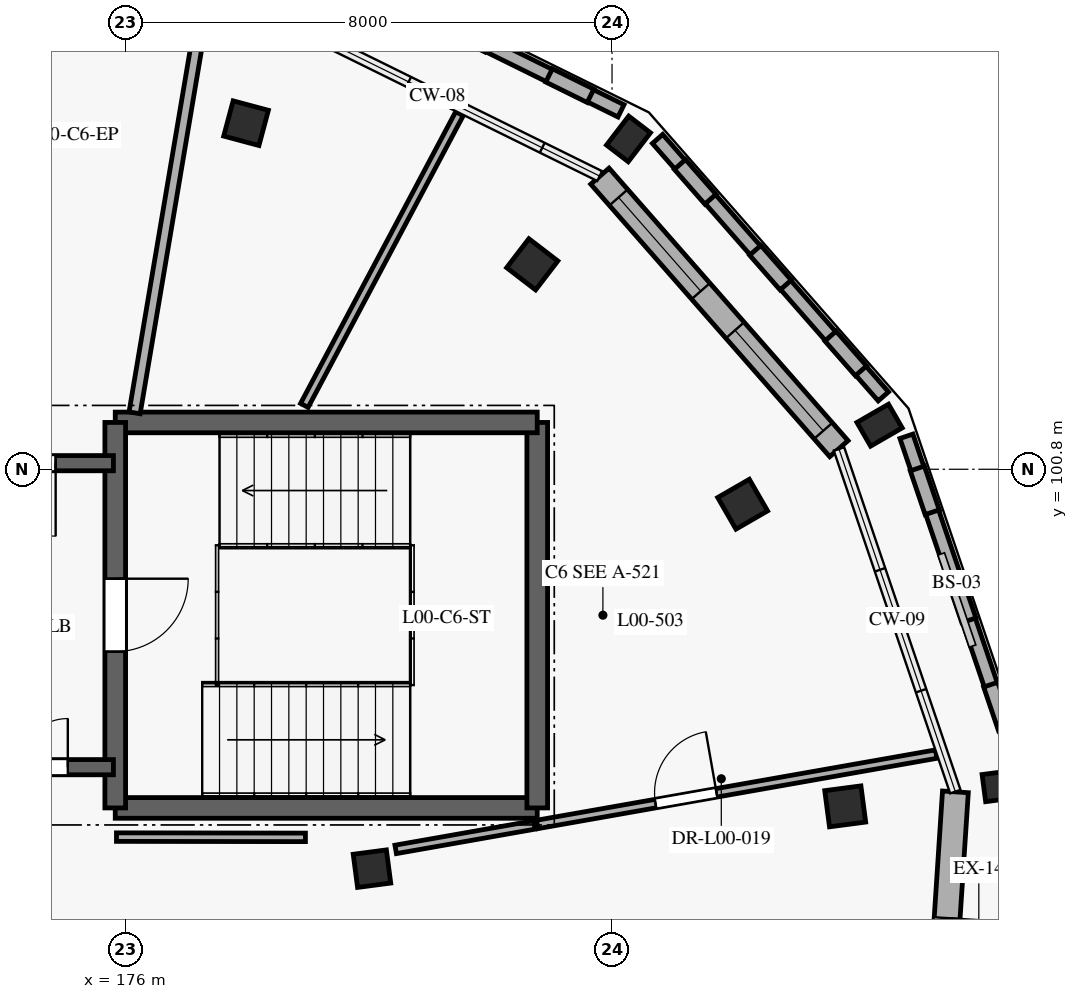
"""IFC4 building model, lengths in metres.
Left out: names, types, materials, properties, quantities, classifications, styles, units other than length and angle.
Written with IfcOpenShell. Run it as: python <this file> out.ifc"""

import sys

from ifc_helpers import new_model, si_unit, direction, frame, frame_2d, origin, origin_2d, place, context, subcontext, project, spatial, rectangle, extrude, element, fill, save


model = new_model("IFC4")
c1 = context("Model", 3, precision=1e-05, world=origin(), true_north=direction((0.0, 1.0)))
c2 = subcontext(c1, "Body", "Model", "MODEL_VIEW")
j1 = project(units=[si_unit("LENGTHUNIT", "METRE"), si_unit("PLANEANGLEUNIT", "RADIAN")], contexts=[c1])
p1 = place(None, origin())
s1 = spatial("IfcSite", under=j1, at=p1, CompositionType="ELEMENT")
p2 = place(p1, origin())
s2 = spatial("IfcBuilding", under=s1, at=p2, CompositionType="ELEMENT")
p3 = place(p2, origin())
s3 = spatial("IfcBuildingStorey", under=s2, at=p3, CompositionType="ELEMENT", Elevation=0.0)
for number, where, z_axis, x_axis in (
    (1, (190.413, 95.595, 0.0), (0.0, 0.0, 1.0), (-0.131, 0.991, 0.0)),
    (2, (188.4, 101.525, 0.0), (0.0, 0.0, 1.0), (-0.5, 0.866, 0.0)),
    (3, (184.271, 106.233, 0.0), (0.0, 0.0, 1.0), (-0.793, 0.609, 0.0)),
):
    element("IfcColumn", number, at=place(p3, frame(where, z_axis=z_axis, x_axis=x_axis)), inside=s3, PredefinedType="PILASTER", context=c2, shape_type="SweptSolid", body=[
        extrude(rectangle(XDim=0.45, YDim=0.6, at=origin_2d()), origin(), (0.0, 0.0, 1.0), 4.2),
    ])
for number, where, z_axis, x_axis in (
    (4, (187.835, 95.256, 0.0), (0.0, 0.0, 1.0), (-0.131, 0.991, 0.0)),
    (5, (186.148, 100.225, 0.0), (0.0, 0.0, 1.0), (-0.5, 0.866, 0.0)),
    (6, (182.688, 104.171, 0.0), (0.0, 0.0, 1.0), (-0.793, 0.609, 0.0)),
    (7, (177.981, 106.492, 0.0), (0.0, 0.0, 1.0), (-0.966, 0.259, 0.0)),
):
    element("IfcColumn", number, at=place(p3, frame(where, z_axis=z_axis, x_axis=x_axis)), inside=s3, PredefinedType="COLUMN", context=c2, shape_type="SweptSolid", body=[
        extrude(rectangle(XDim=0.6, YDim=0.6, at=origin_2d()), origin(), (0.0, 0.0, 1.0), 4.2),
    ])
p4 = place(p3, frame((180.052, 94.231, 0.0), z_axis=(0.0, 0.0, 1.0), x_axis=(0.991444861374, 0.13052619222, 0.0)))
e8 = element("IfcColumn", 8, at=p4, inside=s3, PredefinedType="COLUMN", context=c2, shape_type="SweptSolid", body=[
    extrude(rectangle(XDim=0.55, YDim=0.55, at=origin_2d()), origin(), (0.0, 0.0, 1.0), 4.2),
])
p5 = place(p3, frame((183.801, 105.621, 0.0), z_axis=(0.0, 0.0, 1.0), x_axis=(0.659353757459, -0.751832842143, 0.0)))
e9 = element("IfcWall", 9, at=p5, inside=s3, PredefinedType="SOLIDWALL", context=c2, shape_type="SweptSolid", body=[
    extrude(rectangle(XDim=5.961, YDim=0.4, at=frame_2d((2.98, 0.0))), origin(), (0.0, 0.0, 1.0), 3.94),
])
p6 = place(p5, frame((0.465, 0.0, 0.85)))
e10 = element("IfcOpeningElement", 10, at=p6, cuts=e9, PredefinedType="OPENING", context=c2, shape_type="SweptSolid", body=[
    extrude(rectangle(XDim=2.05, YDim=1.8, at=frame_2d((1.025, 0.9))), frame((0.0, 0.21, 0.0), z_axis=(0.0, -1.0, 0.0), x_axis=(1.0, 0.0, 0.0)), (0.0, 0.0, 1.0), 0.42),
])
p7 = place(p5, frame((3.371, 0.0, 0.85)))
e11 = element("IfcOpeningElement", 11, at=p7, cuts=e9, PredefinedType="OPENING", context=c2, shape_type="SweptSolid", body=[
    extrude(rectangle(XDim=2.2, YDim=1.8, at=frame_2d((1.1, 0.9))), frame((0.0, 0.21, 0.0), z_axis=(0.0, -1.0, 0.0), x_axis=(1.0, 0.0, 0.0)), (0.0, 0.0, 1.0), 0.42),
])
p8 = place(p3, frame((189.647, 95.494, 0.0), z_axis=(0.0, 0.0, 1.0), x_axis=(-0.065407169492, -0.997858658418, 0.0)))
e12 = element("IfcWall", 12, at=p8, inside=s3, PredefinedType="SOLIDWALL", context=c2, shape_type="SweptSolid", body=[
    extrude(rectangle(XDim=5.961, YDim=0.425, at=frame_2d((2.98, 0.0))), origin(), (0.0, 0.0, 1.0), 3.94),
])
p9 = place(p8, frame((2.081, 0.0, 0.0)))
e13 = element("IfcOpeningElement", 13, at=p9, cuts=e12, PredefinedType="OPENING", context=c2, shape_type="SweptSolid", body=[
    extrude(rectangle(XDim=1.8, YDim=2.16, at=frame_2d((0.9, 1.08))), frame((0.0, 0.222, 0.0), z_axis=(0.0, -1.0, 0.0), x_axis=(1.0, 0.0, 0.0)), (0.0, 0.0, 1.0), 0.445),
])
p10 = place(p3, frame((190.652, 96.009, 0.0), z_axis=(0.0, 0.0, 1.0), x_axis=(-0.321450435893, 0.946926405411, 0.0)))
e14 = element("IfcWall", 14, at=p10, inside=s3, PredefinedType="ELEMENTEDWALL", context=c2, shape_type="SweptSolid", body=[
    extrude(rectangle(XDim=5.632, YDim=0.225, at=frame_2d((2.816, 0.0))), origin(), (0.0, 0.0, 1.0), 0.55),
])
for number, where, z_axis, x_axis in (
    (15, (190.472, 96.538, 0.55), (0.0, 0.0, 1.0), (-0.322, 0.947, 0.0)),
    (16, (189.869, 98.316, 0.55), (0.0, 0.0, 1.0), (-0.321, 0.947, 0.0)),
):
    element("IfcWall", number, at=place(p3, frame(where, z_axis=z_axis, x_axis=x_axis)), inside=s3, PredefinedType="ELEMENTEDWALL", context=c2, shape_type="SweptSolid", body=[
        extrude(rectangle(XDim=0.76, YDim=0.245, at=frame_2d((0.38, 0.0))), origin(), (0.0, 0.0, 1.0), 3.39),
    ])
p11 = place(p3, frame((189.265, 100.094, 0.55), z_axis=(0.0, 0.0, 1.0), x_axis=(-0.321620473335, 0.946868666253, 0.0)))
e17 = element("IfcWall", 17, at=p11, inside=s3, PredefinedType="ELEMENTEDWALL", context=c2, shape_type="SweptSolid", body=[
    extrude(rectangle(XDim=0.76, YDim=0.245, at=frame_2d((0.38, 0.0))), origin(), (0.0, 0.0, 1.0), 3.39),
])
p12 = place(p3, frame((188.462, 101.999, 0.0), z_axis=(0.0, 0.0, 1.0), x_axis=(-0.659363462551, 0.751824330714, 0.0)))
e18 = element("IfcWall", 18, at=p12, inside=s3, PredefinedType="ELEMENTEDWALL", context=c2, shape_type="SweptSolid", body=[
    extrude(rectangle(XDim=5.632, YDim=0.225, at=frame_2d((2.816, 0.0))), origin(), (0.0, 0.0, 1.0), 0.55),
])
p13 = place(p3, frame((188.094, 102.419, 0.55), z_axis=(0.0, 0.0, 1.0), x_axis=(-0.659323125798, 0.751859704857, 0.0)))
e19 = element("IfcWall", 19, at=p13, inside=s3, PredefinedType="ELEMENTEDWALL", context=c2, shape_type="SweptSolid", body=[
    extrude(rectangle(XDim=0.76, YDim=0.245, at=frame_2d((0.38, 0.0))), origin(), (0.0, 0.0, 1.0), 3.39),
])
p14 = place(p3, frame((186.856, 103.83, 0.55), z_axis=(0.0, 0.0, 1.0), x_axis=(-0.659345470196, 0.751840109951, 0.0)))
e20 = element("IfcWall", 20, at=p14, inside=s3, PredefinedType="ELEMENTEDWALL", context=c2, shape_type="SweptSolid", body=[
    extrude(rectangle(XDim=0.76, YDim=0.245, at=frame_2d((0.38, 0.0))), origin(), (0.0, 0.0, 1.0), 3.39),
])
p15 = place(p3, frame((185.618, 105.242, 0.55), z_axis=(0.0, 0.0, 1.0), x_axis=(-0.659504701015, 0.751700438565, 0.0)))
e21 = element("IfcWall", 21, at=p15, inside=s3, PredefinedType="ELEMENTEDWALL", context=c2, shape_type="SweptSolid", body=[
    extrude(rectangle(XDim=0.76, YDim=0.245, at=frame_2d((0.38, 0.0))), origin(), (0.0, 0.0, 1.0), 3.39),
])
p16 = place(p3, frame((184.147, 106.695, 0.0), z_axis=(0.0, 0.0, 1.0), x_axis=(-0.896858387366, 0.442317796398, 0.0)))
e22 = element("IfcWall", 22, at=p16, inside=s3, PredefinedType="ELEMENTEDWALL", context=c2, shape_type="SweptSolid", body=[
    extrude(rectangle(XDim=5.633, YDim=0.225, at=frame_2d((2.816, 0.0))), origin(), (0.0, 0.0, 1.0), 0.55),
])
for number, where, z_axis, x_axis in (
    (23, (183.646, 106.942, 0.55), (0.0, 0.0, 1.0), (-0.897, 0.442, 0.0)),
    (24, (181.962, 107.772, 0.55), (0.0, 0.0, 1.0), (-0.897, 0.442, 0.0)),
):
    element("IfcWall", number, at=place(p3, frame(where, z_axis=z_axis, x_axis=x_axis)), inside=s3, PredefinedType="ELEMENTEDWALL", context=c2, shape_type="SweptSolid", body=[
        extrude(rectangle(XDim=0.76, YDim=0.245, at=frame_2d((0.38, 0.0))), origin(), (0.0, 0.0, 1.0), 3.39),
    ])
p17 = place(p3, frame((175.83, 95.23, 0.0), z_axis=(0.0, 0.0, 1.0), x_axis=(1.0, 0.0, 0.0)))
e25 = element("IfcWall", 25, at=p17, inside=s3, PredefinedType="SHEAR", context=c2, shape_type="SweptSolid", body=[
    extrude(rectangle(XDim=6.94, YDim=0.34, at=frame_2d((3.47, 0.0))), origin(), (0.0, 0.0, 1.0), 3.95),
])
p18 = place(p3, frame((182.77, 95.23, 0.0), z_axis=(0.0, 0.0, 1.0), x_axis=(0.0, 1.0, 0.0)))
e26 = element("IfcWall", 26, at=p18, inside=s3, PredefinedType="SHEAR", context=c2, shape_type="SweptSolid", body=[
    extrude(rectangle(XDim=6.34, YDim=0.34, at=frame_2d((3.17, 0.0))), origin(), (0.0, 0.0, 1.0), 3.95),
])
p19 = place(p3, frame((182.77, 101.57, 0.0), z_axis=(0.0, 0.0, 1.0), x_axis=(-1.0, 0.0, 0.0)))
e27 = element("IfcWall", 27, at=p19, inside=s3, PredefinedType="SHEAR", context=c2, shape_type="SweptSolid", body=[
    extrude(rectangle(XDim=6.94, YDim=0.34, at=frame_2d((3.47, 0.0))), origin(), (0.0, 0.0, 1.0), 3.95),
])
p20 = place(p3, frame((175.83, 101.57, 0.0), z_axis=(0.0, 0.0, 1.0), x_axis=(0.0, -1.0, 0.0)))
e28 = element("IfcWall", 28, at=p20, inside=s3, PredefinedType="SHEAR", context=c2, shape_type="SweptSolid", body=[
    extrude(rectangle(XDim=6.34, YDim=0.34, at=frame_2d((3.17, 0.0))), origin(), (0.0, 0.0, 1.0), 3.95),
])
p21 = place(p20, frame((2.57, 0.0, 0.0)))
e29 = element("IfcOpeningElement", 29, at=p21, cuts=e28, PredefinedType="OPENING", context=c2, shape_type="SweptSolid", body=[
    extrude(rectangle(XDim=1.2, YDim=2.1, at=frame_2d((0.6, 1.05))), frame((0.0, 0.18, 0.0), z_axis=(0.0, -1.0, 0.0), x_axis=(1.0, 0.0, 0.0)), (0.0, 0.0, 1.0), 0.36),
])
p22 = place(p3, frame((172.7, 95.9, 0.0), z_axis=(0.0, 0.0, 1.0), x_axis=(1.0, 0.0, 0.0)))
e30 = element("IfcWall", 30, at=p22, inside=s3, PredefinedType="SHEAR", context=c2, shape_type="SweptSolid", body=[
    extrude(rectangle(XDim=3.1, YDim=0.25, at=frame_2d((1.55, 0.0))), origin(), (0.0, 0.0, 1.0), 3.95),
])
p23 = place(p22, frame((0.75, 0.0, 0.0)))
e31 = element("IfcOpeningElement", 31, at=p23, cuts=e30, PredefinedType="OPENING", context=c2, shape_type="SweptSolid", body=[
    extrude(rectangle(XDim=1.6, YDim=2.15, at=frame_2d((0.8, 1.075))), frame((0.0, 0.135, 0.0), z_axis=(0.0, -1.0, 0.0), x_axis=(1.0, 0.0, 0.0)), (0.0, 0.0, 1.0), 0.27),
])
p24 = place(p3, frame((175.8, 100.9, 0.0), z_axis=(0.0, 0.0, 1.0), x_axis=(-1.0, 0.0, 0.0)))
e32 = element("IfcWall", 32, at=p24, inside=s3, PredefinedType="SHEAR", context=c2, shape_type="SweptSolid", body=[
    extrude(rectangle(XDim=3.1, YDim=0.25, at=frame_2d((1.55, 0.0))), origin(), (0.0, 0.0, 1.0), 3.95),
])
p25 = place(p24, frame((0.95, 0.0, 0.0)))
e33 = element("IfcOpeningElement", 33, at=p25, cuts=e32, PredefinedType="OPENING", context=c2, shape_type="SweptSolid", body=[
    extrude(rectangle(XDim=1.2, YDim=2.1, at=frame_2d((0.6, 1.05))), frame((0.0, 0.135, 0.0), z_axis=(0.0, -1.0, 0.0), x_axis=(1.0, 0.0, 0.0)), (0.0, 0.0, 1.0), 0.27),
])
p26 = place(p3, frame((176.148, 101.728, 0.0), z_axis=(0.0, 0.0, 1.0), x_axis=(0.166482807525, 0.986044357419, 0.0)))
e34 = element("IfcWall", 34, at=p26, inside=s3, PredefinedType="PARTITIONING", context=c2, shape_type="SweptSolid", body=[
    extrude(rectangle(XDim=6.515, YDim=0.185, at=frame_2d((3.258, 0.0))), origin(), (0.0, 0.0, 1.0), 3.915),
])
p27 = place(p3, frame((180.442, 94.548, 0.0), z_axis=(0.0, 0.0, 1.0), x_axis=(0.984803709336, 0.173671108934, 0.0)))
e35 = element("IfcWall", 35, at=p27, inside=s3, PredefinedType="PLUMBINGWALL", context=c2, shape_type="SweptSolid", body=[
    extrude(rectangle(XDim=2.317, YDim=0.14, at=frame_2d((1.158, 0.0))), origin(), (0.0, 0.0, 1.0), 3.267),
])
p28 = place(p3, frame((182.77, 94.958, 0.0), z_axis=(0.0, 0.0, 1.0), x_axis=(0.984809373829, 0.173638985308, 0.0)))
e36 = element("IfcWall", 36, at=p28, inside=s3, PredefinedType="PLUMBINGWALL", context=c2, shape_type="SweptSolid", body=[
    extrude(rectangle(XDim=6.662, YDim=0.14, at=frame_2d((3.331, 0.0))), origin(), (0.0, 0.0, 1.0), 3.915),
])
p29 = place(p28, frame((1.975, 0.0, 0.0)))
e37 = element("IfcOpeningElement", 37, at=p29, cuts=e36, PredefinedType="OPENING", context=c2, shape_type="SweptSolid", body=[
    extrude(rectangle(XDim=1.02, YDim=2.06, at=frame_2d((0.51, 1.03))), frame((0.0, 0.08, 0.0), z_axis=(0.0, -1.0, 0.0), x_axis=(1.0, 0.0, 0.0)), (0.0, 0.0, 1.0), 0.16),
])
p30 = place(p3, frame((181.491, 106.648, 0.0), z_axis=(0.0, 0.0, 1.0), x_axis=(-0.46950120322, -0.882931832122, 0.0)))
e38 = element("IfcWall", 38, at=p30, inside=s3, PredefinedType="PLUMBINGWALL", context=c2, shape_type="SweptSolid", body=[
    extrude(rectangle(XDim=5.434, YDim=0.14, at=frame_2d((2.717, 0.0))), origin(), (0.0, 0.0, 1.0), 3.915),
])
p31 = place(p3, frame((175.85, 94.75, 0.0), z_axis=(0.0, 0.0, 1.0), x_axis=(0.999999108177, -0.001335531844, 0.0)))
e39 = element("IfcWall", 39, at=p31, inside=s3, PredefinedType="PLUMBINGWALL", context=c2, shape_type="SweptSolid", body=[
    extrude(rectangle(XDim=3.108, YDim=0.14, at=frame_2d((1.554, 0.0))), origin(), (0.0, 0.0, 1.0), 3.915),
])
p32 = place(p9, origin())
e40 = element("IfcDoor", 40, at=p32, inside=s3, OperationType="DOUBLE_DOOR_SINGLE_SWING", PredefinedType="DOOR", context=c2, shape_type="SweptSolid", body=[
    extrude(rectangle(XDim=1.8, YDim=2.16, at=frame_2d((0.9, 1.08))), frame((0.0, 0.025, 0.0), z_axis=(0.0, -1.0, 0.0), x_axis=(1.0, 0.0, 0.0)), (0.0, 0.0, 1.0), 0.05),
])
fill(e13, e40)
p33 = place(p6, origin())
e41 = element("IfcWindow", 41, at=p33, inside=s3, PartitioningType="SINGLE_PANEL", PredefinedType="WINDOW", context=c2, shape_type="SweptSolid", body=[
    extrude(rectangle(XDim=2.05, YDim=1.8, at=frame_2d((1.025, 0.9))), frame((0.0, 0.03, 0.0), z_axis=(0.0, -1.0, 0.0), x_axis=(1.0, 0.0, 0.0)), (0.0, 0.0, 1.0), 0.06),
])
fill(e10, e41)
p34 = place(p7, origin())
e42 = element("IfcWindow", 42, at=p34, inside=s3, PartitioningType="SINGLE_PANEL", PredefinedType="WINDOW", context=c2, shape_type="SweptSolid", body=[
    extrude(rectangle(XDim=2.2, YDim=1.8, at=frame_2d((1.1, 0.9))), frame((0.0, 0.03, 0.0), z_axis=(0.0, -1.0, 0.0), x_axis=(1.0, 0.0, 0.0)), (0.0, 0.0, 1.0), 0.06),
])
fill(e11, e42)
p35 = place(p21, frame((1.2, 0.0, 0.0), z_axis=(0.0, 0.0, 1.0), x_axis=(-1.0, 0.0, 0.0)))
e43 = element("IfcDoor", 43, at=p35, inside=s3, OperationType="SINGLE_SWING_LEFT", PredefinedType="DOOR", context=c2, shape_type="SweptSolid", body=[
    extrude(rectangle(XDim=1.2, YDim=2.1, at=frame_2d((0.6, 1.05))), frame((0.0, 0.025, 0.0), z_axis=(0.0, -1.0, 0.0), x_axis=(1.0, 0.0, 0.0)), (0.0, 0.0, 1.0), 0.05),
])
fill(e29, e43)
p36 = place(p23, frame((1.6, 0.0, 0.0), z_axis=(0.0, 0.0, 1.0), x_axis=(-1.0, 0.0, 0.0)))
e44 = element("IfcDoor", 44, at=p36, inside=s3, OperationType="DOUBLE_DOOR_SINGLE_SWING", PredefinedType="DOOR", context=c2, shape_type="SweptSolid", body=[
    extrude(rectangle(XDim=1.6, YDim=2.15, at=frame_2d((0.8, 1.075))), frame((0.0, 0.025, 0.0), z_axis=(0.0, -1.0, 0.0), x_axis=(1.0, 0.0, 0.0)), (0.0, 0.0, 1.0), 0.05),
])
fill(e31, e44)
p37 = place(p25, frame((1.2, 0.0, 0.0), z_axis=(0.0, 0.0, 1.0), x_axis=(-1.0, 0.0, 0.0)))
e45 = element("IfcDoor", 45, at=p37, inside=s3, OperationType="SINGLE_SWING_LEFT", PredefinedType="DOOR", context=c2, shape_type="SweptSolid", body=[
    extrude(rectangle(XDim=1.2, YDim=2.1, at=frame_2d((0.6, 1.05))), frame((0.0, 0.025, 0.0), z_axis=(0.0, -1.0, 0.0), x_axis=(1.0, 0.0, 0.0)), (0.0, 0.0, 1.0), 0.05),
])
fill(e33, e45)
p38 = place(p29, origin())
e46 = element("IfcDoor", 46, at=p38, inside=s3, OperationType="SINGLE_SWING_RIGHT", PredefinedType="DOOR", context=c2, shape_type="SweptSolid", body=[
    extrude(rectangle(XDim=1.02, YDim=2.06, at=frame_2d((0.51, 1.03))), frame((0.0, 0.025, 0.0), z_axis=(0.0, -1.0, 0.0), x_axis=(1.0, 0.0, 0.0)), (0.0, 0.0, 1.0), 0.05),
])
fill(e37, e46)
save(model, sys.argv[1])
